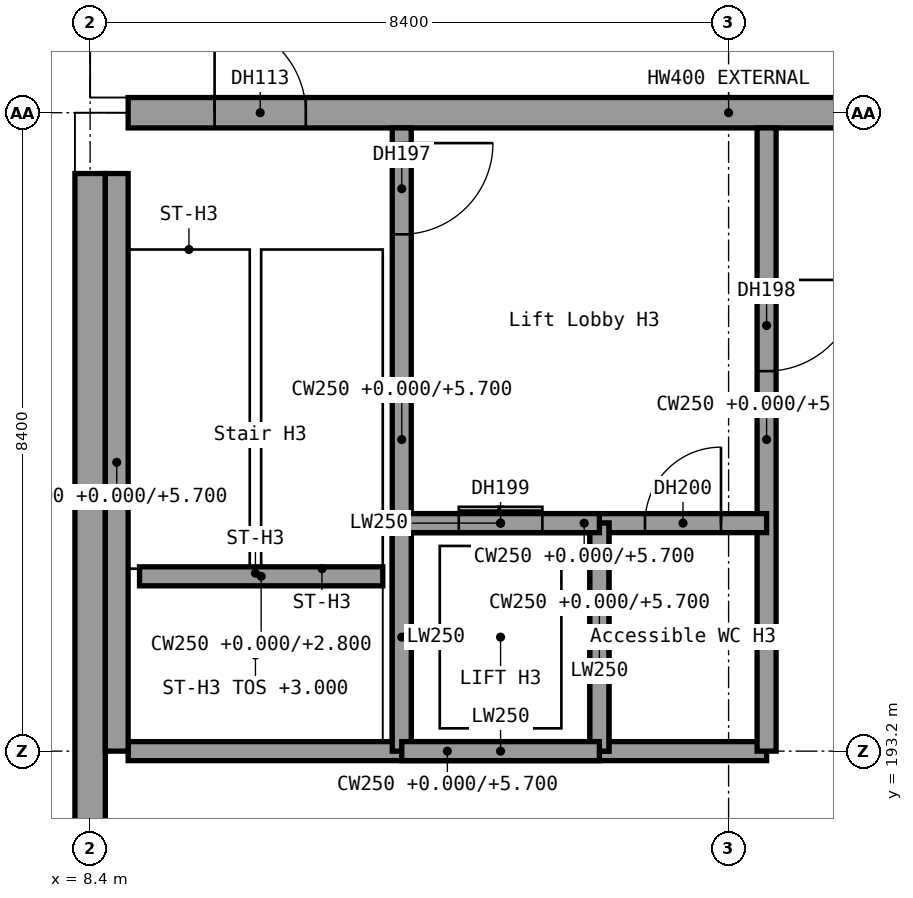
"""IFC4 building model, lengths in metres.
Left out: names, types, materials, properties, quantities, classifications, styles, units other than length and angle.
Written with IfcOpenShell. Run it as: python <this file> out.ifc"""

import sys

from ifc_helpers import new_model, si_unit, direction, frame, frame_2d, origin, origin_2d, place, context, subcontext, project, spatial, rectangle, extrude, element, fill, save


model = new_model("IFC4")
c1 = context("Model", 3, precision=1e-05, world=origin(), true_north=direction((0.0, 1.0)))
c2 = subcontext(c1, "Body", "Model", "MODEL_VIEW")
j1 = project(units=[si_unit("LENGTHUNIT", "METRE"), si_unit("PLANEANGLEUNIT", "RADIAN")], contexts=[c1])
p1 = place(None, origin())
s1 = spatial("IfcSite", under=j1, at=p1, CompositionType="ELEMENT")
p2 = place(p1, origin())
s2 = spatial("IfcBuilding", under=s1, at=p2, CompositionType="ELEMENT")
p3 = place(p2, origin())
s3 = spatial("IfcBuildingStorey", under=s2, at=p3, CompositionType="ELEMENT", Elevation=0.0)
p4 = place(p3, frame((8.4, 201.6, 0.0), z_axis=(0.0, 0.0, 1.0), x_axis=(1.0, 0.0, 0.0)))
e1 = element("IfcColumn", 1, at=p4, inside=s3, PredefinedType="COLUMN", context=c2, shape_type="SweptSolid", body=[
    extrude(rectangle(XDim=1.0, YDim=1.6, at=origin_2d()), origin(), (0.0, 0.0, 1.0), 6.0),
])
p5 = place(p3, frame((8.9, 201.6, 0.0), z_axis=(0.0, 0.0, 1.0), x_axis=(1.0, 0.0, 0.0)))
e2 = element("IfcWall", 2, at=p5, inside=s3, PredefinedType="STANDARD", context=c2, shape_type="SweptSolid", body=[
    extrude(rectangle(XDim=15.8, YDim=0.4, at=frame_2d((7.9, 0.0))), origin(), (0.0, 0.0, 1.0), 4.5),
])
p6 = place(p5, frame((1.137, 0.0, 0.0)))
e3 = element("IfcOpeningElement", 3, at=p6, cuts=e2, PredefinedType="OPENING", context=c2, shape_type="SweptSolid", body=[
    extrude(rectangle(XDim=1.2, YDim=2.1, at=frame_2d((0.6, 1.05))), frame((0.0, 0.2, 0.0), z_axis=(0.0, -1.0, 0.0), x_axis=(1.0, 0.0, 0.0)), (0.0, 0.0, 1.0), 0.4),
])
p7 = place(p5, frame((11.4, 0.0, 0.0)))
e4 = element("IfcOpeningElement", 4, at=p7, cuts=e2, PredefinedType="OPENING", context=c2, shape_type="SweptSolid", body=[
    extrude(rectangle(XDim=3.0, YDim=2.4, at=frame_2d((1.5, 1.2))), frame((0.0, 0.2, 0.0), z_axis=(0.0, -1.0, 0.0), x_axis=(1.0, 0.0, 0.0)), (0.0, 0.0, 1.0), 0.4),
])
p8 = place(p3, frame((8.4, 101.6, 0.0), z_axis=(0.0, 0.0, 1.0), x_axis=(0.0, 1.0, 0.0)))
e5 = element("IfcWall", 5, at=p8, inside=s3, PredefinedType="SHEAR", context=c2, shape_type="SweptSolid", body=[
    extrude(rectangle(XDim=99.2, YDim=0.4, at=frame_2d((49.6, 0.0))), origin(), (0.0, 0.0, 1.0), 6.0),
])
p9 = place(p8, frame((18.3, 0.0, 1.0)))
e6 = element("IfcOpeningElement", 6, at=p9, cuts=e5, PredefinedType="OPENING", context=c2, shape_type="SweptSolid", body=[
    extrude(rectangle(XDim=4.2, YDim=2.4, at=frame_2d((2.1, 1.2))), frame((0.0, 0.2, 0.0), z_axis=(0.0, -1.0, 0.0), x_axis=(1.0, 0.0, 0.0)), (0.0, 0.0, 1.0), 0.4),
])
p10 = place(p8, frame((38.3, 0.0, 1.0)))
e7 = element("IfcOpeningElement", 7, at=p10, cuts=e5, PredefinedType="OPENING", context=c2, shape_type="SweptSolid", body=[
    extrude(rectangle(XDim=4.2, YDim=2.4, at=frame_2d((2.1, 1.2))), frame((0.0, 0.2, 0.0), z_axis=(0.0, -1.0, 0.0), x_axis=(1.0, 0.0, 0.0)), (0.0, 0.0, 1.0), 0.4),
])
p11 = place(p8, frame((56.3, 0.0, 1.0)))
e8 = element("IfcOpeningElement", 8, at=p11, cuts=e5, PredefinedType="OPENING", context=c2, shape_type="SweptSolid", body=[
    extrude(rectangle(XDim=4.2, YDim=2.4, at=frame_2d((2.1, 1.2))), frame((0.0, 0.2, 0.0), z_axis=(0.0, -1.0, 0.0), x_axis=(1.0, 0.0, 0.0)), (0.0, 0.0, 1.0), 0.4),
])
p12 = place(p8, frame((76.3, 0.0, 1.0)))
e9 = element("IfcOpeningElement", 9, at=p12, cuts=e5, PredefinedType="OPENING", context=c2, shape_type="SweptSolid", body=[
    extrude(rectangle(XDim=4.2, YDim=2.4, at=frame_2d((2.1, 1.2))), frame((0.0, 0.2, 0.0), z_axis=(0.0, -1.0, 0.0), x_axis=(1.0, 0.0, 0.0)), (0.0, 0.0, 1.0), 0.4),
])
p13 = place(p3, frame((12.5, 201.4, 0.0), z_axis=(0.0, 0.0, 1.0), x_axis=(0.0, -1.0, 0.0)))
e10 = element("IfcWall", 10, at=p13, inside=s3, PredefinedType="SHEAR", context=c2, shape_type="SweptSolid", body=[
    extrude(rectangle(XDim=8.2, YDim=0.25, at=frame_2d((4.1, 0.0))), origin(), (0.0, 0.0, 1.0), 5.7),
])
p14 = place(p13, frame((0.2, 0.0, 0.0)))
e11 = element("IfcOpeningElement", 11, at=p14, cuts=e10, PredefinedType="OPENING", context=c2, shape_type="SweptSolid", body=[
    extrude(rectangle(XDim=1.2, YDim=2.1, at=frame_2d((0.6, 1.05))), frame((0.0, 0.125, 0.0), z_axis=(0.0, -1.0, 0.0), x_axis=(1.0, 0.0, 0.0)), (0.0, 0.0, 1.0), 0.25),
])
p15 = place(p3, frame((8.9, 193.2, 0.0), z_axis=(0.0, 0.0, 1.0), x_axis=(1.0, 0.0, 0.0)))
e12 = element("IfcWall", 12, at=p15, inside=s3, PredefinedType="SHEAR", context=c2, shape_type="SweptSolid", body=[
    extrude(rectangle(XDim=8.4, YDim=0.25, at=frame_2d((4.2, 0.0))), origin(), (0.0, 0.0, 1.0), 5.7),
])
p16 = place(p3, frame((17.3, 201.4, 0.0), z_axis=(0.0, 0.0, 1.0), x_axis=(0.0, -1.0, 0.0)))
e13 = element("IfcWall", 13, at=p16, inside=s3, PredefinedType="SHEAR", context=c2, shape_type="SweptSolid", body=[
    extrude(rectangle(XDim=8.2, YDim=0.25, at=frame_2d((4.1, 0.0))), origin(), (0.0, 0.0, 1.0), 5.7),
])
p17 = place(p16, frame((2.0, 0.0, 0.0)))
e14 = element("IfcOpeningElement", 14, at=p17, cuts=e13, PredefinedType="OPENING", context=c2, shape_type="SweptSolid", body=[
    extrude(rectangle(XDim=1.2, YDim=2.1, at=frame_2d((0.6, 1.05))), frame((0.0, 0.125, 0.0), z_axis=(0.0, -1.0, 0.0), x_axis=(1.0, 0.0, 0.0)), (0.0, 0.0, 1.0), 0.25),
])
p18 = place(p3, frame((12.5, 196.2, 0.0), z_axis=(0.0, 0.0, 1.0), x_axis=(1.0, 0.0, 0.0)))
e15 = element("IfcWall", 15, at=p18, inside=s3, PredefinedType="SHEAR", context=c2, shape_type="SweptSolid", body=[
    extrude(rectangle(XDim=4.8, YDim=0.25, at=frame_2d((2.4, 0.0))), origin(), (0.0, 0.0, 1.0), 5.7),
])
p19 = place(p18, frame((0.75, 0.0, 0.0)))
e16 = element("IfcOpeningElement", 16, at=p19, cuts=e15, PredefinedType="OPENING", context=c2, shape_type="SweptSolid", body=[
    extrude(rectangle(XDim=1.1, YDim=2.1, at=frame_2d((0.55, 1.05))), frame((0.0, 0.125, 0.0), z_axis=(0.0, -1.0, 0.0), x_axis=(1.0, 0.0, 0.0)), (0.0, 0.0, 1.0), 0.25),
])
p20 = place(p18, frame((3.2, 0.0, 0.0)))
e17 = element("IfcOpeningElement", 17, at=p20, cuts=e15, PredefinedType="OPENING", context=c2, shape_type="SweptSolid", body=[
    extrude(rectangle(XDim=1.0, YDim=2.1, at=frame_2d((0.5, 1.05))), frame((0.0, 0.125, 0.0), z_axis=(0.0, -1.0, 0.0), x_axis=(1.0, 0.0, 0.0)), (0.0, 0.0, 1.0), 0.25),
])
p21 = place(p3, frame((15.1, 196.2, 0.0), z_axis=(0.0, 0.0, 1.0), x_axis=(0.0, -1.0, 0.0)))
e18 = element("IfcWall", 18, at=p21, inside=s3, PredefinedType="SHEAR", context=c2, shape_type="SweptSolid", body=[
    extrude(rectangle(XDim=3.0, YDim=0.25, at=frame_2d((1.5, 0.0))), origin(), (0.0, 0.0, 1.0), 5.7),
])
p22 = place(p3, frame((8.75, 200.8, 0.0), z_axis=(0.0, 0.0, 1.0), x_axis=(0.0, -1.0, 0.0)))
e19 = element("IfcWall", 19, at=p22, inside=s3, PredefinedType="SHEAR", context=c2, shape_type="SweptSolid", body=[
    extrude(rectangle(XDim=7.6, YDim=0.3, at=frame_2d((3.8, 0.0))), origin(), (0.0, 0.0, 1.0), 5.7),
])
p23 = place(p3, frame((9.05, 195.5, 0.0), z_axis=(0.0, 0.0, 1.0), x_axis=(1.0, 0.0, 0.0)))
e20 = element("IfcWall", 20, at=p23, inside=s3, PredefinedType="SHEAR", context=c2, shape_type="SweptSolid", body=[
    extrude(rectangle(XDim=3.2, YDim=0.25, at=frame_2d((1.6, 0.0))), origin(), (0.0, 0.0, 1.0), 2.8),
])
for number, where, z_axis, x_axis in (
    (21, (12.5, 196.2, -1.4), (0.0, 0.0, 1.0), (0.0, -1.0, 0.0)),
    (22, (15.1, 196.2, -1.4), (0.0, 0.0, 1.0), (0.0, -1.0, 0.0)),
):
    element("IfcWall", number, at=place(p3, frame(where, z_axis=z_axis, x_axis=x_axis)), inside=s3, PredefinedType="SHEAR", context=c2, shape_type="SweptSolid", body=[
        extrude(rectangle(XDim=3.0, YDim=0.25, at=frame_2d((1.5, 0.0))), origin(), (0.0, 0.0, 1.0), 1.4),
    ])
for number, where, z_axis, x_axis in (
    (23, (12.5, 196.2, -1.4), (0.0, 0.0, 1.0), (1.0, 0.0, 0.0)),
    (24, (12.5, 193.2, -1.4), (0.0, 0.0, 1.0), (1.0, 0.0, 0.0)),
):
    element("IfcWall", number, at=place(p3, frame(where, z_axis=z_axis, x_axis=x_axis)), inside=s3, PredefinedType="SHEAR", context=c2, shape_type="SweptSolid", body=[
        extrude(rectangle(XDim=2.6, YDim=0.25, at=frame_2d((1.3, 0.0))), origin(), (0.0, 0.0, 1.0), 1.4),
    ])
p24 = place(p6, origin())
e25 = element("IfcDoor", 25, at=p24, inside=s3, OperationType="SINGLE_SWING_LEFT", PredefinedType="DOOR", context=c2, shape_type="SweptSolid", body=[
    extrude(rectangle(XDim=1.2, YDim=2.1, at=frame_2d((0.6, 1.05))), frame((0.0, 0.025, 0.0), z_axis=(0.0, -1.0, 0.0), x_axis=(1.0, 0.0, 0.0)), (0.0, 0.0, 1.0), 0.05),
])
fill(e3, e25)
p25 = place(p14, origin())
e26 = element("IfcDoor", 26, at=p25, inside=s3, OperationType="SINGLE_SWING_LEFT", PredefinedType="DOOR", context=c2, shape_type="SweptSolid", body=[
    extrude(rectangle(XDim=1.2, YDim=2.1, at=frame_2d((0.6, 1.05))), frame((0.0, 0.025, 0.0), z_axis=(0.0, -1.0, 0.0), x_axis=(1.0, 0.0, 0.0)), (0.0, 0.0, 1.0), 0.05),
])
fill(e11, e26)
p26 = place(p17, origin())
e27 = element("IfcDoor", 27, at=p26, inside=s3, OperationType="SINGLE_SWING_LEFT", PredefinedType="DOOR", context=c2, shape_type="SweptSolid", body=[
    extrude(rectangle(XDim=1.2, YDim=2.1, at=frame_2d((0.6, 1.05))), frame((0.0, 0.025, 0.0), z_axis=(0.0, -1.0, 0.0), x_axis=(1.0, 0.0, 0.0)), (0.0, 0.0, 1.0), 0.05),
])
fill(e14, e27)
p27 = place(p19, origin())
e28 = element("IfcDoor", 28, at=p27, inside=s3, OperationType="DOUBLE_DOOR_SLIDING", PredefinedType="DOOR", context=c2, shape_type="SweptSolid", body=[
    extrude(rectangle(XDim=1.1, YDim=2.1, at=frame_2d((0.55, 1.05))), frame((0.0, 0.025, 0.0), z_axis=(0.0, -1.0, 0.0), x_axis=(1.0, 0.0, 0.0)), (0.0, 0.0, 1.0), 0.05),
])
fill(e16, e28)
p28 = place(p20, origin())
e29 = element("IfcDoor", 29, at=p28, inside=s3, OperationType="SINGLE_SWING_RIGHT", PredefinedType="DOOR", context=c2, shape_type="SweptSolid", body=[
    extrude(rectangle(XDim=1.0, YDim=2.1, at=frame_2d((0.5, 1.05))), frame((0.0, 0.025, 0.0), z_axis=(0.0, -1.0, 0.0), x_axis=(1.0, 0.0, 0.0)), (0.0, 0.0, 1.0), 0.05),
])
fill(e17, e29)
save(model, sys.argv[1])
